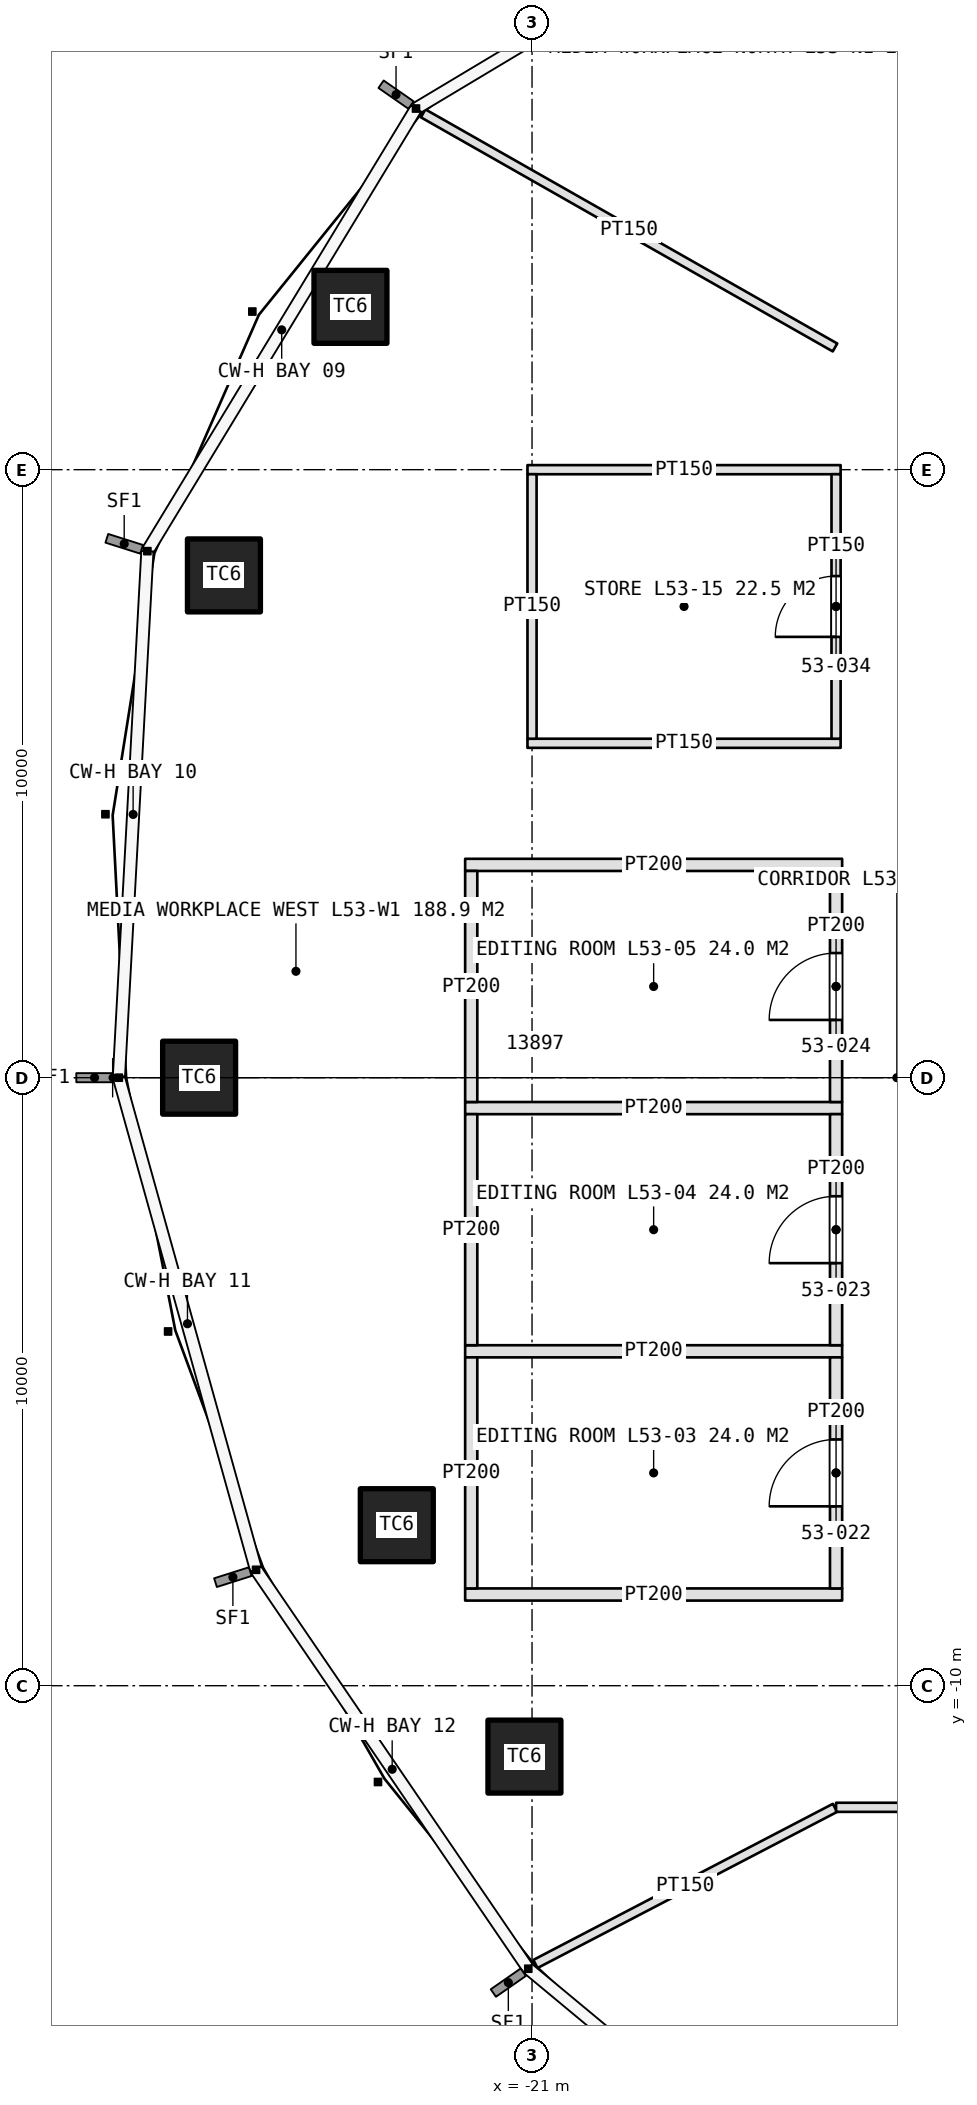
"""IFC4 building model, lengths in metres.
Left out: names, types, materials, properties, quantities, classifications, styles, units other than length and angle.
Written with IfcOpenShell. Run it as: python <this file> out.ifc"""

import sys

from ifc_helpers import new_model, si_unit, direction, frame, frame_2d, origin, origin_2d, place, context, subcontext, project, spatial, rectangle, extrude, element, fill, save


model = new_model("IFC4")
c1 = context("Model", 3, precision=1e-05, world=origin(), true_north=direction((0.0, 1.0)))
c2 = subcontext(c1, "Body", "Model", "MODEL_VIEW")
j1 = project(units=[si_unit("LENGTHUNIT", "METRE"), si_unit("PLANEANGLEUNIT", "RADIAN")], contexts=[c1])
p1 = place(None, origin())
s1 = spatial("IfcSite", under=j1, at=p1, CompositionType="ELEMENT")
p2 = place(p1, origin())
s2 = spatial("IfcBuilding", under=s1, at=p2, CompositionType="ELEMENT")
p3 = place(p2, frame((0.0, 0.0, 241.0)))
s3 = spatial("IfcBuildingStorey", under=s2, at=p3, CompositionType="ELEMENT", Elevation=241.0)
for number, where, z_axis, x_axis in (
    (1, (-23.986, 12.678, 0.0), (0.0, 0.0, 1.0), (1.0, 0.0, 0.0)),
    (2, (-26.067, 8.261, 0.0), (0.0, 0.0, 1.0), (1.0, 0.0, 0.0)),
    (3, (-26.475, 0.0, 0.0), (0.0, 0.0, 1.0), (1.0, 0.0, 0.0)),
    (4, (-23.224, -7.36, 0.0), (0.0, 0.0, 1.0), (1.0, 0.0, 0.0)),
    (5, (-21.125, -11.166, 0.0), (0.0, 0.0, 1.0), (1.0, 0.0, 0.0)),
):
    element("IfcColumn", number, at=place(p3, frame(where, z_axis=z_axis, x_axis=x_axis)), inside=s3, PredefinedType="COLUMN", context=c2, shape_type="SweptSolid", body=[
        extrude(rectangle(XDim=1.2, YDim=1.2, at=origin_2d()), origin(), (0.0, 0.0, 1.0), 4.2),
    ])
for number, where, z_axis, x_axis in (
    (6, (-15.9, -8.5, 0.0), (0.0, 0.0, 1.0), (-1.0, 0.0, 0.0)),
    (7, (-15.9, -4.5, 0.0), (0.0, 0.0, 1.0), (-1.0, 0.0, 0.0)),
    (8, (-15.9, -0.5, 0.0), (0.0, 0.0, 1.0), (-1.0, 0.0, 0.0)),
    (9, (-15.9, 3.5, 0.0), (0.0, 0.0, 1.0), (-1.0, 0.0, 0.0)),
):
    element("IfcWall", number, at=place(p3, frame(where, z_axis=z_axis, x_axis=x_axis)), inside=s3, PredefinedType="PARTITIONING", context=c2, shape_type="SweptSolid", body=[
        extrude(rectangle(XDim=6.2, YDim=0.2, at=frame_2d((3.1, 0.0))), origin(), (0.0, 0.0, 1.0), 3.0),
    ])
p4 = place(p3, frame((-16.0, -8.4, 0.0), z_axis=(0.0, 0.0, 1.0), x_axis=(0.0, 1.0, 0.0)))
e10 = element("IfcWall", 10, at=p4, inside=s3, PredefinedType="PARTITIONING", context=c2, shape_type="SweptSolid", body=[
    extrude(rectangle(XDim=3.8, YDim=0.2, at=frame_2d((1.9, 0.0))), origin(), (0.0, 0.0, 1.0), 3.0),
])
p5 = place(p4, frame((1.35, 0.0, 0.0)))
e11 = element("IfcOpeningElement", 11, at=p5, cuts=e10, PredefinedType="OPENING", context=c2, shape_type="SweptSolid", body=[
    extrude(rectangle(XDim=1.1, YDim=2.3, at=frame_2d((0.55, 1.15))), frame((0.0, 0.11, 0.0), z_axis=(0.0, -1.0, 0.0), x_axis=(1.0, 0.0, 0.0)), (0.0, 0.0, 1.0), 0.22),
])
p6 = place(p3, frame((-22.0, -8.4, 0.0), z_axis=(0.0, 0.0, 1.0), x_axis=(0.0, 1.0, 0.0)))
e12 = element("IfcWall", 12, at=p6, inside=s3, PredefinedType="PARTITIONING", context=c2, shape_type="SweptSolid", body=[
    extrude(rectangle(XDim=3.8, YDim=0.2, at=frame_2d((1.9, 0.0))), origin(), (0.0, 0.0, 1.0), 3.0),
])
p7 = place(p3, frame((-16.0, -4.4, 0.0), z_axis=(0.0, 0.0, 1.0), x_axis=(0.0, 1.0, 0.0)))
e13 = element("IfcWall", 13, at=p7, inside=s3, PredefinedType="PARTITIONING", context=c2, shape_type="SweptSolid", body=[
    extrude(rectangle(XDim=3.8, YDim=0.2, at=frame_2d((1.9, 0.0))), origin(), (0.0, 0.0, 1.0), 3.0),
])
p8 = place(p7, frame((1.35, 0.0, 0.0)))
e14 = element("IfcOpeningElement", 14, at=p8, cuts=e13, PredefinedType="OPENING", context=c2, shape_type="SweptSolid", body=[
    extrude(rectangle(XDim=1.1, YDim=2.3, at=frame_2d((0.55, 1.15))), frame((0.0, 0.11, 0.0), z_axis=(0.0, -1.0, 0.0), x_axis=(1.0, 0.0, 0.0)), (0.0, 0.0, 1.0), 0.22),
])
p9 = place(p3, frame((-22.0, -4.4, 0.0), z_axis=(0.0, 0.0, 1.0), x_axis=(0.0, 1.0, 0.0)))
e15 = element("IfcWall", 15, at=p9, inside=s3, PredefinedType="PARTITIONING", context=c2, shape_type="SweptSolid", body=[
    extrude(rectangle(XDim=3.8, YDim=0.2, at=frame_2d((1.9, 0.0))), origin(), (0.0, 0.0, 1.0), 3.0),
])
p10 = place(p3, frame((-16.0, -0.4, 0.0), z_axis=(0.0, 0.0, 1.0), x_axis=(0.0, 1.0, 0.0)))
e16 = element("IfcWall", 16, at=p10, inside=s3, PredefinedType="PARTITIONING", context=c2, shape_type="SweptSolid", body=[
    extrude(rectangle(XDim=3.8, YDim=0.2, at=frame_2d((1.9, 0.0))), origin(), (0.0, 0.0, 1.0), 3.0),
])
p11 = place(p10, frame((1.35, 0.0, 0.0)))
e17 = element("IfcOpeningElement", 17, at=p11, cuts=e16, PredefinedType="OPENING", context=c2, shape_type="SweptSolid", body=[
    extrude(rectangle(XDim=1.1, YDim=2.3, at=frame_2d((0.55, 1.15))), frame((0.0, 0.11, 0.0), z_axis=(0.0, -1.0, 0.0), x_axis=(1.0, 0.0, 0.0)), (0.0, 0.0, 1.0), 0.22),
])
p12 = place(p3, frame((-22.0, -0.4, 0.0), z_axis=(0.0, 0.0, 1.0), x_axis=(0.0, 1.0, 0.0)))
e18 = element("IfcWall", 18, at=p12, inside=s3, PredefinedType="PARTITIONING", context=c2, shape_type="SweptSolid", body=[
    extrude(rectangle(XDim=3.8, YDim=0.2, at=frame_2d((1.9, 0.0))), origin(), (0.0, 0.0, 1.0), 3.0),
])
for number, where, z_axis, x_axis in (
    (19, (-15.925, 5.5, 0.0), (0.0, 0.0, 1.0), (-1.0, 0.0, 0.0)),
    (20, (-15.925, 10.0, 0.0), (0.0, 0.0, 1.0), (-1.0, 0.0, 0.0)),
):
    element("IfcWall", number, at=place(p3, frame(where, z_axis=z_axis, x_axis=x_axis)), inside=s3, PredefinedType="PARTITIONING", context=c2, shape_type="SweptSolid", body=[
        extrude(rectangle(XDim=5.15, YDim=0.15, at=frame_2d((2.575, 0.0))), origin(), (0.0, 0.0, 1.0), 3.0),
    ])
p13 = place(p3, frame((-16.0, 5.575, 0.0), z_axis=(0.0, 0.0, 1.0), x_axis=(0.0, 1.0, 0.0)))
e21 = element("IfcWall", 21, at=p13, inside=s3, PredefinedType="PARTITIONING", context=c2, shape_type="SweptSolid", body=[
    extrude(rectangle(XDim=4.35, YDim=0.15, at=frame_2d((2.175, 0.0))), origin(), (0.0, 0.0, 1.0), 3.0),
])
p14 = place(p13, frame((1.675, 0.0, 0.0)))
e22 = element("IfcOpeningElement", 22, at=p14, cuts=e21, PredefinedType="OPENING", context=c2, shape_type="SweptSolid", body=[
    extrude(rectangle(XDim=1.0, YDim=2.2, at=frame_2d((0.5, 1.1))), frame((0.0, 0.085, 0.0), z_axis=(0.0, -1.0, 0.0), x_axis=(1.0, 0.0, 0.0)), (0.0, 0.0, 1.0), 0.17),
])
p15 = place(p3, frame((-21.0, 5.575, 0.0), z_axis=(0.0, 0.0, 1.0), x_axis=(0.0, 1.0, 0.0)))
e23 = element("IfcWall", 23, at=p15, inside=s3, PredefinedType="PARTITIONING", context=c2, shape_type="SweptSolid", body=[
    extrude(rectangle(XDim=4.35, YDim=0.15, at=frame_2d((2.175, 0.0))), origin(), (0.0, 0.0, 1.0), 3.0),
])
p16 = place(p3, frame((-16.018, -12.009, 0.0), z_axis=(0.0, 0.0, 1.0), x_axis=(-0.886831549241, -0.462092851351, 0.0)))
e24 = element("IfcWall", 24, at=p16, inside=s3, PredefinedType="PARTITIONING", context=c2, shape_type="SweptSolid", body=[
    extrude(rectangle(XDim=5.555, YDim=0.15, at=frame_2d((2.778, 0.0))), origin(), (0.0, 0.0, 1.0), 3.0),
])
p17 = place(p3, frame((-16.017, 12.01, 0.0), z_axis=(0.0, 0.0, 1.0), x_axis=(-0.869357432803, 0.494183826151, 0.0)))
e25 = element("IfcWall", 25, at=p17, inside=s3, PredefinedType="PARTITIONING", context=c2, shape_type="SweptSolid", body=[
    extrude(rectangle(XDim=7.791, YDim=0.15, at=frame_2d((3.896, 0.0))), origin(), (0.0, 0.0, 1.0), 3.0),
])
p18 = place(p3, frame((-16.0, -12.0, 0.0), z_axis=(0.0, 0.0, 1.0), x_axis=(1.0, 0.0, 0.0)))
e26 = element("IfcWall", 26, at=p18, inside=s3, PredefinedType="PARTITIONING", context=c2, shape_type="SweptSolid", body=[
    extrude(rectangle(XDim=6.0, YDim=0.15, at=frame_2d((3.0, 0.0))), origin(), (0.0, 0.0, 1.0), 3.0),
])
p19 = place(p18, frame((3.9, 0.0, 0.0)))
e27 = element("IfcOpeningElement", 27, at=p19, cuts=e26, PredefinedType="OPENING", context=c2, shape_type="SweptSolid", body=[
    extrude(rectangle(XDim=1.6, YDim=2.4, at=frame_2d((0.8, 1.2))), frame((0.0, 0.085, 0.0), z_axis=(0.0, -1.0, 0.0), x_axis=(1.0, 0.0, 0.0)), (0.0, 0.0, 1.0), 0.17),
])
p20 = place(p5, origin())
e28 = element("IfcDoor", 28, at=p20, inside=s3, OperationType="SINGLE_SWING_LEFT", PredefinedType="DOOR", context=c2, shape_type="SweptSolid", body=[
    extrude(rectangle(XDim=1.1, YDim=2.3, at=frame_2d((0.55, 1.15))), frame((0.0, 0.025, 0.0), z_axis=(0.0, -1.0, 0.0), x_axis=(1.0, 0.0, 0.0)), (0.0, 0.0, 1.0), 0.05),
])
fill(e11, e28)
p21 = place(p8, origin())
e29 = element("IfcDoor", 29, at=p21, inside=s3, OperationType="SINGLE_SWING_LEFT", PredefinedType="DOOR", context=c2, shape_type="SweptSolid", body=[
    extrude(rectangle(XDim=1.1, YDim=2.3, at=frame_2d((0.55, 1.15))), frame((0.0, 0.025, 0.0), z_axis=(0.0, -1.0, 0.0), x_axis=(1.0, 0.0, 0.0)), (0.0, 0.0, 1.0), 0.05),
])
fill(e14, e29)
p22 = place(p11, origin())
e30 = element("IfcDoor", 30, at=p22, inside=s3, OperationType="SINGLE_SWING_LEFT", PredefinedType="DOOR", context=c2, shape_type="SweptSolid", body=[
    extrude(rectangle(XDim=1.1, YDim=2.3, at=frame_2d((0.55, 1.15))), frame((0.0, 0.025, 0.0), z_axis=(0.0, -1.0, 0.0), x_axis=(1.0, 0.0, 0.0)), (0.0, 0.0, 1.0), 0.05),
])
fill(e17, e30)
p23 = place(p14, origin())
e31 = element("IfcDoor", 31, at=p23, inside=s3, OperationType="SINGLE_SWING_LEFT", PredefinedType="DOOR", context=c2, shape_type="SweptSolid", body=[
    extrude(rectangle(XDim=1.0, YDim=2.2, at=frame_2d((0.5, 1.1))), frame((0.0, 0.025, 0.0), z_axis=(0.0, -1.0, 0.0), x_axis=(1.0, 0.0, 0.0)), (0.0, 0.0, 1.0), 0.05),
])
fill(e22, e31)
save(model, sys.argv[1])
